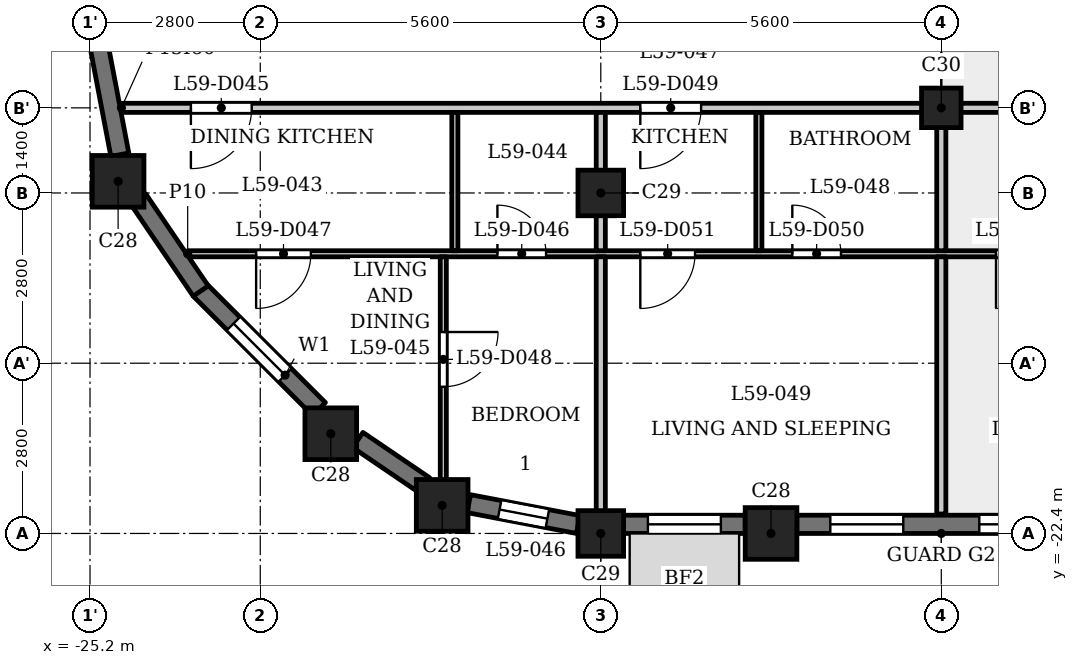
"""IFC4 building model, lengths in metres.
Left out: names, types, materials, properties, quantities, classifications, styles, units other than length and angle.
Written with IfcOpenShell. Run it as: python <this file> out.ifc"""

import sys

from ifc_helpers import new_model, si_unit, direction, frame, frame_2d, origin, origin_2d, place, context, subcontext, project, spatial, rectangle, extrude, element, fill, save


model = new_model("IFC4")
c1 = context("Model", 3, precision=1e-05, world=origin(), true_north=direction((0.0, 1.0)))
c2 = subcontext(c1, "Body", "Model", "MODEL_VIEW")
j1 = project(units=[si_unit("LENGTHUNIT", "METRE"), si_unit("PLANEANGLEUNIT", "RADIAN")], contexts=[c1])
p1 = place(None, origin())
s1 = spatial("IfcSite", under=j1, at=p1, CompositionType="ELEMENT")
p2 = place(p1, origin())
s2 = spatial("IfcBuilding", under=s1, at=p2, CompositionType="ELEMENT")
p3 = place(p2, frame((0.0, 0.0, 227.4)))
s3 = spatial("IfcBuildingStorey", under=s2, at=p3, CompositionType="ELEMENT", Elevation=227.4)
for number, where, z_axis, x_axis in (
    (1, (-19.409, -21.938, 0.0), (0.0, 0.0, 1.0), (1.0, 0.0, 0.0)),
    (2, (-14.0, -22.4, 0.0), (0.0, 0.0, 1.0), (1.0, 0.0, 0.0)),
    (3, (-24.738, -16.609, 0.0), (0.0, 0.0, 1.0), (1.0, 0.0, 0.0)),
    (4, (-21.24, -20.76, 0.0), (0.0, 0.0, 1.0), (1.0, 0.0, 0.0)),
):
    element("IfcColumn", number, at=place(p3, frame(where, z_axis=z_axis, x_axis=x_axis)), inside=s3, PredefinedType="COLUMN", context=c2, shape_type="SweptSolid", body=[
        extrude(rectangle(XDim=0.85, YDim=0.85, at=origin_2d()), origin(), (0.0, 0.0, 1.0), 3.5),
    ])
for number, where, z_axis, x_axis in (
    (5, (-16.8, -22.4, 0.0), (0.0, 0.0, 1.0), (1.0, 0.0, 0.0)),
    (6, (-16.8, -16.8, 0.0), (0.0, 0.0, 1.0), (1.0, 0.0, 0.0)),
):
    element("IfcColumn", number, at=place(p3, frame(where, z_axis=z_axis, x_axis=x_axis)), inside=s3, PredefinedType="COLUMN", context=c2, shape_type="SweptSolid", body=[
        extrude(rectangle(XDim=0.75, YDim=0.75, at=origin_2d()), origin(), (0.0, 0.0, 1.0), 3.5),
    ])
p4 = place(p3, frame((-11.2, -15.4, 0.0), z_axis=(0.0, 0.0, 1.0), x_axis=(1.0, 0.0, 0.0)))
e7 = element("IfcColumn", 7, at=p4, inside=s3, PredefinedType="COLUMN", context=c2, shape_type="SweptSolid", body=[
    extrude(rectangle(XDim=0.65, YDim=0.65, at=origin_2d()), origin(), (0.0, 0.0, 1.0), 3.5),
])
p5 = place(p3, frame((-23.397, -18.391, 0.0), z_axis=(0.0, 0.0, 1.0), x_axis=(0.707106781187, -0.707106781187, 0.0)))
e8 = element("IfcWall", 8, at=p5, inside=s3, PredefinedType="SOLIDWALL", context=c2, shape_type="SweptSolid", body=[
    extrude(rectangle(XDim=2.775, YDim=0.3, at=frame_2d((1.388, 0.0))), origin(), (0.0, 0.0, 1.0), 2.45),
])
p6 = place(p5, frame((0.788, 0.0, 0.6)))
e9 = element("IfcOpeningElement", 9, at=p6, cuts=e8, PredefinedType="OPENING", context=c2, shape_type="SweptSolid", body=[
    extrude(rectangle(XDim=1.2, YDim=1.55, at=frame_2d((0.6, 0.775))), frame((0.0, 0.16, 0.0), z_axis=(0.0, -1.0, 0.0), x_axis=(1.0, 0.0, 0.0)), (0.0, 0.0, 1.0), 0.32),
])
p7 = place(p3, frame((-20.796, -20.862, 0.0), z_axis=(0.0, 0.0, 1.0), x_axis=(0.827035970432, -0.562149004813, 0.0)))
e10 = element("IfcWall", 10, at=p7, inside=s3, PredefinedType="SOLIDWALL", context=c2, shape_type="SweptSolid", body=[
    extrude(rectangle(XDim=1.327, YDim=0.3, at=frame_2d((0.664, 0.0))), origin(), (0.0, 0.0, 1.0), 2.45),
])
p8 = place(p3, frame((-18.971, -21.91, 0.0), z_axis=(0.0, 0.0, 1.0), x_axis=(0.982300037503, -0.187314271538, 0.0)))
e11 = element("IfcWall", 11, at=p8, inside=s3, PredefinedType="SOLIDWALL", context=c2, shape_type="SweptSolid", body=[
    extrude(rectangle(XDim=1.831, YDim=0.3, at=frame_2d((0.916, 0.0))), origin(), (0.0, 0.0, 1.0), 2.45),
])
p9 = place(p8, frame((0.516, 0.0, 0.6)))
e12 = element("IfcOpeningElement", 12, at=p9, cuts=e11, PredefinedType="OPENING", context=c2, shape_type="SweptSolid", body=[
    extrude(rectangle(XDim=0.8, YDim=1.55, at=frame_2d((0.4, 0.775))), frame((0.0, 0.16, 0.0), z_axis=(0.0, -1.0, 0.0), x_axis=(1.0, 0.0, 0.0)), (0.0, 0.0, 1.0), 0.32),
])
p10 = place(p3, frame((-16.425, -22.25, 0.0), z_axis=(0.0, 0.0, 1.0), x_axis=(1.0, 0.0, 0.0)))
e13 = element("IfcWall", 13, at=p10, inside=s3, PredefinedType="SOLIDWALL", context=c2, shape_type="SweptSolid", body=[
    extrude(rectangle(XDim=2.0, YDim=0.3, at=frame_2d((1.0, 0.0))), origin(), (0.0, 0.0, 1.0), 2.45),
])
p11 = place(p10, frame((0.4, 0.0, 0.6)))
e14 = element("IfcOpeningElement", 14, at=p11, cuts=e13, PredefinedType="OPENING", context=c2, shape_type="SweptSolid", body=[
    extrude(rectangle(XDim=1.2, YDim=1.55, at=frame_2d((0.6, 0.775))), frame((0.0, 0.16, 0.0), z_axis=(0.0, -1.0, 0.0), x_axis=(1.0, 0.0, 0.0)), (0.0, 0.0, 1.0), 0.32),
])
p12 = place(p3, frame((-13.575, -22.25, 0.0), z_axis=(0.0, 0.0, 1.0), x_axis=(1.0, 0.0, 0.0)))
e15 = element("IfcWall", 15, at=p12, inside=s3, PredefinedType="SOLIDWALL", context=c2, shape_type="SweptSolid", body=[
    extrude(rectangle(XDim=4.75, YDim=0.3, at=frame_2d((2.375, 0.0))), origin(), (0.0, 0.0, 1.0), 2.45),
])
p13 = place(p12, frame((0.55, 0.0, 0.6)))
e16 = element("IfcOpeningElement", 16, at=p13, cuts=e15, PredefinedType="OPENING", context=c2, shape_type="SweptSolid", body=[
    extrude(rectangle(XDim=1.2, YDim=1.55, at=frame_2d((0.6, 0.775))), frame((0.0, 0.16, 0.0), z_axis=(0.0, -1.0, 0.0), x_axis=(1.0, 0.0, 0.0)), (0.0, 0.0, 1.0), 0.32),
])
p14 = place(p12, frame((3.0, 0.0, 0.6)))
e17 = element("IfcOpeningElement", 17, at=p14, cuts=e15, PredefinedType="OPENING", context=c2, shape_type="SweptSolid", body=[
    extrude(rectangle(XDim=1.2, YDim=1.55, at=frame_2d((0.6, 0.775))), frame((0.0, 0.16, 0.0), z_axis=(0.0, -1.0, 0.0), x_axis=(1.0, 0.0, 0.0)), (0.0, 0.0, 1.0), 0.32),
])
for number, where, z_axis, x_axis in (
    (18, (-25.053, -14.372, 0.0), (0.0, 0.0, 1.0), (0.187, -0.982, 0.0)),
    (19, (-24.408, -16.898, 0.0), (0.0, 0.0, 1.0), (0.562, -0.827, 0.0)),
):
    element("IfcWall", number, at=place(p3, frame(where, z_axis=z_axis, x_axis=x_axis)), inside=s3, PredefinedType="SOLIDWALL", context=c2, shape_type="SweptSolid", body=[
        extrude(rectangle(XDim=1.831, YDim=0.3, at=frame_2d((0.916, 0.0))), origin(), (0.0, 0.0, 1.0), 2.45),
    ])
p15 = place(p3, frame((-23.594, -17.8, 0.0), z_axis=(0.0, 0.0, 1.0), x_axis=(1.0, 0.0, 0.0)))
e20 = element("IfcWall", 20, at=p15, inside=s3, PredefinedType="PARTITIONING", context=c2, shape_type="SweptSolid", body=[
    extrude(rectangle(XDim=47.188, YDim=0.1, at=frame_2d((23.594, 0.0))), origin(), (0.0, 0.0, 1.0), 3.15),
])
p16 = place(p15, frame((5.094, 0.0, 0.0)))
e21 = element("IfcOpeningElement", 21, at=p16, cuts=e20, PredefinedType="OPENING", context=c2, shape_type="SweptSolid", body=[
    extrude(rectangle(XDim=0.8, YDim=2.1, at=frame_2d((0.4, 1.05))), frame((0.0, 0.06, 0.0), z_axis=(0.0, -1.0, 0.0), x_axis=(1.0, 0.0, 0.0)), (0.0, 0.0, 1.0), 0.12),
])
p17 = place(p15, frame((1.126, 0.0, 0.0)))
e22 = element("IfcOpeningElement", 22, at=p17, cuts=e20, PredefinedType="OPENING", context=c2, shape_type="SweptSolid", body=[
    extrude(rectangle(XDim=0.9, YDim=2.1, at=frame_2d((0.45, 1.05))), frame((0.0, 0.06, 0.0), z_axis=(0.0, -1.0, 0.0), x_axis=(1.0, 0.0, 0.0)), (0.0, 0.0, 1.0), 0.12),
])
p18 = place(p15, frame((9.944, 0.0, 0.0)))
e23 = element("IfcOpeningElement", 23, at=p18, cuts=e20, PredefinedType="OPENING", context=c2, shape_type="SweptSolid", body=[
    extrude(rectangle(XDim=0.8, YDim=2.1, at=frame_2d((0.4, 1.05))), frame((0.0, 0.06, 0.0), z_axis=(0.0, -1.0, 0.0), x_axis=(1.0, 0.0, 0.0)), (0.0, 0.0, 1.0), 0.12),
])
p19 = place(p15, frame((7.444, 0.0, 0.0)))
e24 = element("IfcOpeningElement", 24, at=p19, cuts=e20, PredefinedType="OPENING", context=c2, shape_type="SweptSolid", body=[
    extrude(rectangle(XDim=0.9, YDim=2.1, at=frame_2d((0.45, 1.05))), frame((0.0, 0.06, 0.0), z_axis=(0.0, -1.0, 0.0), x_axis=(1.0, 0.0, 0.0)), (0.0, 0.0, 1.0), 0.12),
])
p20 = place(p15, frame((16.544, 0.0, 0.0)))
e25 = element("IfcOpeningElement", 25, at=p20, cuts=e20, PredefinedType="OPENING", context=c2, shape_type="SweptSolid", body=[
    extrude(rectangle(XDim=0.8, YDim=2.1, at=frame_2d((0.4, 1.05))), frame((0.0, 0.06, 0.0), z_axis=(0.0, -1.0, 0.0), x_axis=(1.0, 0.0, 0.0)), (0.0, 0.0, 1.0), 0.12),
])
p21 = place(p15, frame((13.294, 0.0, 0.0)))
e26 = element("IfcOpeningElement", 26, at=p21, cuts=e20, PredefinedType="OPENING", context=c2, shape_type="SweptSolid", body=[
    extrude(rectangle(XDim=0.9, YDim=2.1, at=frame_2d((0.45, 1.05))), frame((0.0, 0.06, 0.0), z_axis=(0.0, -1.0, 0.0), x_axis=(1.0, 0.0, 0.0)), (0.0, 0.0, 1.0), 0.12),
])
p22 = place(p15, frame((21.144, 0.0, 0.0)))
e27 = element("IfcOpeningElement", 27, at=p22, cuts=e20, PredefinedType="OPENING", context=c2, shape_type="SweptSolid", body=[
    extrude(rectangle(XDim=0.8, YDim=2.1, at=frame_2d((0.4, 1.05))), frame((0.0, 0.06, 0.0), z_axis=(0.0, -1.0, 0.0), x_axis=(1.0, 0.0, 0.0)), (0.0, 0.0, 1.0), 0.12),
])
p23 = place(p15, frame((18.894, 0.0, 0.0)))
e28 = element("IfcOpeningElement", 28, at=p23, cuts=e20, PredefinedType="OPENING", context=c2, shape_type="SweptSolid", body=[
    extrude(rectangle(XDim=0.9, YDim=2.1, at=frame_2d((0.45, 1.05))), frame((0.0, 0.06, 0.0), z_axis=(0.0, -1.0, 0.0), x_axis=(1.0, 0.0, 0.0)), (0.0, 0.0, 1.0), 0.12),
])
p24 = place(p15, frame((35.944, 0.0, 0.0)))
e29 = element("IfcOpeningElement", 29, at=p24, cuts=e20, PredefinedType="OPENING", context=c2, shape_type="SweptSolid", body=[
    extrude(rectangle(XDim=0.9, YDim=2.1, at=frame_2d((0.45, 1.05))), frame((0.0, 0.06, 0.0), z_axis=(0.0, -1.0, 0.0), x_axis=(1.0, 0.0, 0.0)), (0.0, 0.0, 1.0), 0.12),
])
p25 = place(p15, frame((32.594, 0.0, 0.0)))
e30 = element("IfcOpeningElement", 30, at=p25, cuts=e20, PredefinedType="OPENING", context=c2, shape_type="SweptSolid", body=[
    extrude(rectangle(XDim=0.9, YDim=2.1, at=frame_2d((0.45, 1.05))), frame((0.0, 0.06, 0.0), z_axis=(0.0, -1.0, 0.0), x_axis=(1.0, 0.0, 0.0)), (0.0, 0.0, 1.0), 0.12),
])
p26 = place(p15, frame((40.944, 0.0, 0.0)))
e31 = element("IfcOpeningElement", 31, at=p26, cuts=e20, PredefinedType="OPENING", context=c2, shape_type="SweptSolid", body=[
    extrude(rectangle(XDim=0.8, YDim=2.1, at=frame_2d((0.4, 1.05))), frame((0.0, 0.06, 0.0), z_axis=(0.0, -1.0, 0.0), x_axis=(1.0, 0.0, 0.0)), (0.0, 0.0, 1.0), 0.12),
])
p27 = place(p15, frame((45.444, 0.0, 0.0)))
e32 = element("IfcOpeningElement", 32, at=p27, cuts=e20, PredefinedType="OPENING", context=c2, shape_type="SweptSolid", body=[
    extrude(rectangle(XDim=0.9, YDim=2.1, at=frame_2d((0.45, 1.05))), frame((0.0, 0.06, 0.0), z_axis=(0.0, -1.0, 0.0), x_axis=(1.0, 0.0, 0.0)), (0.0, 0.0, 1.0), 0.12),
])
p28 = place(p3, frame((-24.684, -15.4, 0.0), z_axis=(0.0, 0.0, 1.0), x_axis=(1.0, 0.0, 0.0)))
e33 = element("IfcWall", 33, at=p28, inside=s3, PredefinedType="PARTITIONING", context=c2, shape_type="SweptSolid", body=[
    extrude(rectangle(XDim=49.368, YDim=0.15, at=frame_2d((24.684, 0.0))), origin(), (0.0, 0.0, 1.0), 3.15),
])
p29 = place(p28, frame((1.143, 0.0, 0.0)))
e34 = element("IfcOpeningElement", 34, at=p29, cuts=e33, PredefinedType="OPENING", context=c2, shape_type="SweptSolid", body=[
    extrude(rectangle(XDim=1.0, YDim=2.1, at=frame_2d((0.5, 1.05))), frame((0.0, 0.085, 0.0), z_axis=(0.0, -1.0, 0.0), x_axis=(1.0, 0.0, 0.0)), (0.0, 0.0, 1.0), 0.17),
])
p30 = place(p28, frame((8.534, 0.0, 0.0)))
e35 = element("IfcOpeningElement", 35, at=p30, cuts=e33, PredefinedType="OPENING", context=c2, shape_type="SweptSolid", body=[
    extrude(rectangle(XDim=1.0, YDim=2.1, at=frame_2d((0.5, 1.05))), frame((0.0, 0.085, 0.0), z_axis=(0.0, -1.0, 0.0), x_axis=(1.0, 0.0, 0.0)), (0.0, 0.0, 1.0), 0.17),
])
p31 = place(p28, frame((15.384, 0.0, 0.0)))
e36 = element("IfcOpeningElement", 36, at=p31, cuts=e33, PredefinedType="OPENING", context=c2, shape_type="SweptSolid", body=[
    extrude(rectangle(XDim=1.0, YDim=2.1, at=frame_2d((0.5, 1.05))), frame((0.0, 0.085, 0.0), z_axis=(0.0, -1.0, 0.0), x_axis=(1.0, 0.0, 0.0)), (0.0, 0.0, 1.0), 0.17),
])
p32 = place(p28, frame((19.984, 0.0, 0.0)))
e37 = element("IfcOpeningElement", 37, at=p32, cuts=e33, PredefinedType="OPENING", context=c2, shape_type="SweptSolid", body=[
    extrude(rectangle(XDim=1.0, YDim=2.1, at=frame_2d((0.5, 1.05))), frame((0.0, 0.085, 0.0), z_axis=(0.0, -1.0, 0.0), x_axis=(1.0, 0.0, 0.0)), (0.0, 0.0, 1.0), 0.17),
])
p33 = place(p28, frame((39.784, 0.0, 0.0)))
e38 = element("IfcOpeningElement", 38, at=p33, cuts=e33, PredefinedType="OPENING", context=c2, shape_type="SweptSolid", body=[
    extrude(rectangle(XDim=1.0, YDim=2.1, at=frame_2d((0.5, 1.05))), frame((0.0, 0.085, 0.0), z_axis=(0.0, -1.0, 0.0), x_axis=(1.0, 0.0, 0.0)), (0.0, 0.0, 1.0), 0.17),
])
p34 = place(p28, frame((47.384, 0.0, 0.0)))
e39 = element("IfcOpeningElement", 39, at=p34, cuts=e33, PredefinedType="OPENING", context=c2, shape_type="SweptSolid", body=[
    extrude(rectangle(XDim=1.0, YDim=2.1, at=frame_2d((0.5, 1.05))), frame((0.0, 0.085, 0.0), z_axis=(0.0, -1.0, 0.0), x_axis=(1.0, 0.0, 0.0)), (0.0, 0.0, 1.0), 0.17),
])
p35 = place(p3, frame((-19.39, -21.86, 0.0), z_axis=(0.0, 0.0, 1.0), x_axis=(0.0, 1.0, 0.0)))
e40 = element("IfcWall", 40, at=p35, inside=s3, PredefinedType="PARTITIONING", context=c2, shape_type="SweptSolid", body=[
    extrude(rectangle(XDim=4.01, YDim=0.1, at=frame_2d((2.005, 0.0))), origin(), (0.0, 0.0, 1.0), 3.15),
])
p36 = place(p35, frame((1.873, 0.0, 0.0)))
e41 = element("IfcOpeningElement", 41, at=p36, cuts=e40, PredefinedType="OPENING", context=c2, shape_type="SweptSolid", body=[
    extrude(rectangle(XDim=0.9, YDim=2.1, at=frame_2d((0.45, 1.05))), frame((0.0, 0.06, 0.0), z_axis=(0.0, -1.0, 0.0), x_axis=(1.0, 0.0, 0.0)), (0.0, 0.0, 1.0), 0.12),
])
p37 = place(p3, frame((-19.2, -17.75, 0.0), z_axis=(0.0, 0.0, 1.0), x_axis=(0.0, 1.0, 0.0)))
e42 = element("IfcWall", 42, at=p37, inside=s3, PredefinedType="PARTITIONING", context=c2, shape_type="SweptSolid", body=[
    extrude(rectangle(XDim=2.275, YDim=0.1, at=frame_2d((1.137, 0.0))), origin(), (0.0, 0.0, 1.0), 3.15),
])
p38 = place(p3, frame((-16.8, -22.31, 0.0), z_axis=(0.0, 0.0, 1.0), x_axis=(0.0, 1.0, 0.0)))
e43 = element("IfcWall", 43, at=p38, inside=s3, PredefinedType="PARTITIONING", context=c2, shape_type="SweptSolid", body=[
    extrude(rectangle(XDim=4.46, YDim=0.15, at=frame_2d((2.23, 0.0))), origin(), (0.0, 0.0, 1.0), 2.5),
])
p39 = place(p3, frame((-16.8, -17.75, 0.0), z_axis=(0.0, 0.0, 1.0), x_axis=(0.0, 1.0, 0.0)))
e44 = element("IfcWall", 44, at=p39, inside=s3, PredefinedType="PARTITIONING", context=c2, shape_type="SweptSolid", body=[
    extrude(rectangle(XDim=2.275, YDim=0.15, at=frame_2d((1.137, 0.0))), origin(), (0.0, 0.0, 1.0), 2.5),
])
p40 = place(p3, frame((-14.2, -17.75, 0.0), z_axis=(0.0, 0.0, 1.0), x_axis=(0.0, 1.0, 0.0)))
e45 = element("IfcWall", 45, at=p40, inside=s3, PredefinedType="PARTITIONING", context=c2, shape_type="SweptSolid", body=[
    extrude(rectangle(XDim=2.275, YDim=0.1, at=frame_2d((1.137, 0.0))), origin(), (0.0, 0.0, 1.0), 3.15),
])
p41 = place(p3, frame((-11.2, -22.08, 0.0), z_axis=(0.0, 0.0, 1.0), x_axis=(0.0, 1.0, 0.0)))
e46 = element("IfcWall", 46, at=p41, inside=s3, PredefinedType="PARTITIONING", context=c2, shape_type="SweptSolid", body=[
    extrude(rectangle(XDim=4.23, YDim=0.15, at=frame_2d((2.115, 0.0))), origin(), (0.0, 0.0, 1.0), 3.15),
])
p42 = place(p3, frame((-11.2, -17.75, 0.0), z_axis=(0.0, 0.0, 1.0), x_axis=(0.0, 1.0, 0.0)))
e47 = element("IfcWall", 47, at=p42, inside=s3, PredefinedType="PARTITIONING", context=c2, shape_type="SweptSolid", body=[
    extrude(rectangle(XDim=2.275, YDim=0.15, at=frame_2d((1.137, 0.0))), origin(), (0.0, 0.0, 1.0), 3.15),
])
p43 = place(p29, origin())
e48 = element("IfcDoor", 48, at=p43, inside=s3, OperationType="SINGLE_SWING_LEFT", PredefinedType="DOOR", context=c2, shape_type="SweptSolid", body=[
    extrude(rectangle(XDim=1.0, YDim=2.1, at=frame_2d((0.5, 1.05))), frame((0.0, 0.025, 0.0), z_axis=(0.0, -1.0, 0.0), x_axis=(1.0, 0.0, 0.0)), (0.0, 0.0, 1.0), 0.05),
])
fill(e34, e48)
p44 = place(p16, origin())
e49 = element("IfcDoor", 49, at=p44, inside=s3, OperationType="SINGLE_SWING_RIGHT", PredefinedType="DOOR", context=c2, shape_type="SweptSolid", body=[
    extrude(rectangle(XDim=0.8, YDim=2.1, at=frame_2d((0.4, 1.05))), frame((0.0, 0.025, 0.0), z_axis=(0.0, -1.0, 0.0), x_axis=(1.0, 0.0, 0.0)), (0.0, 0.0, 1.0), 0.05),
])
fill(e21, e49)
p45 = place(p17, origin())
e50 = element("IfcDoor", 50, at=p45, inside=s3, OperationType="SINGLE_SWING_LEFT", PredefinedType="DOOR", context=c2, shape_type="SweptSolid", body=[
    extrude(rectangle(XDim=0.9, YDim=2.1, at=frame_2d((0.45, 1.05))), frame((0.0, 0.025, 0.0), z_axis=(0.0, -1.0, 0.0), x_axis=(1.0, 0.0, 0.0)), (0.0, 0.0, 1.0), 0.05),
])
fill(e22, e50)
p46 = place(p36, origin())
e51 = element("IfcDoor", 51, at=p46, inside=s3, OperationType="SINGLE_SWING_RIGHT", PredefinedType="DOOR", context=c2, shape_type="SweptSolid", body=[
    extrude(rectangle(XDim=0.9, YDim=2.1, at=frame_2d((0.45, 1.05))), frame((0.0, 0.025, 0.0), z_axis=(0.0, -1.0, 0.0), x_axis=(1.0, 0.0, 0.0)), (0.0, 0.0, 1.0), 0.05),
])
fill(e41, e51)
p47 = place(p30, origin())
e52 = element("IfcDoor", 52, at=p47, inside=s3, OperationType="SINGLE_SWING_LEFT", PredefinedType="DOOR", context=c2, shape_type="SweptSolid", body=[
    extrude(rectangle(XDim=1.0, YDim=2.1, at=frame_2d((0.5, 1.05))), frame((0.0, 0.025, 0.0), z_axis=(0.0, -1.0, 0.0), x_axis=(1.0, 0.0, 0.0)), (0.0, 0.0, 1.0), 0.05),
])
fill(e35, e52)
p48 = place(p18, origin())
e53 = element("IfcDoor", 53, at=p48, inside=s3, OperationType="SINGLE_SWING_RIGHT", PredefinedType="DOOR", context=c2, shape_type="SweptSolid", body=[
    extrude(rectangle(XDim=0.8, YDim=2.1, at=frame_2d((0.4, 1.05))), frame((0.0, 0.025, 0.0), z_axis=(0.0, -1.0, 0.0), x_axis=(1.0, 0.0, 0.0)), (0.0, 0.0, 1.0), 0.05),
])
fill(e23, e53)
p49 = place(p19, origin())
e54 = element("IfcDoor", 54, at=p49, inside=s3, OperationType="SINGLE_SWING_LEFT", PredefinedType="DOOR", context=c2, shape_type="SweptSolid", body=[
    extrude(rectangle(XDim=0.9, YDim=2.1, at=frame_2d((0.45, 1.05))), frame((0.0, 0.025, 0.0), z_axis=(0.0, -1.0, 0.0), x_axis=(1.0, 0.0, 0.0)), (0.0, 0.0, 1.0), 0.05),
])
fill(e24, e54)
p50 = place(p21, origin())
e55 = element("IfcDoor", 55, at=p50, inside=s3, OperationType="SINGLE_SWING_LEFT", PredefinedType="DOOR", context=c2, shape_type="SweptSolid", body=[
    extrude(rectangle(XDim=0.9, YDim=2.1, at=frame_2d((0.45, 1.05))), frame((0.0, 0.025, 0.0), z_axis=(0.0, -1.0, 0.0), x_axis=(1.0, 0.0, 0.0)), (0.0, 0.0, 1.0), 0.05),
])
fill(e26, e55)
p51 = place(p6, origin())
e56 = element("IfcWindow", 56, at=p51, inside=s3, PartitioningType="SINGLE_PANEL", PredefinedType="WINDOW", context=c2, shape_type="SweptSolid", body=[
    extrude(rectangle(XDim=1.2, YDim=1.55, at=frame_2d((0.6, 0.775))), frame((0.0, 0.03, 0.0), z_axis=(0.0, -1.0, 0.0), x_axis=(1.0, 0.0, 0.0)), (0.0, 0.0, 1.0), 0.06),
])
fill(e9, e56)
p52 = place(p9, origin())
e57 = element("IfcWindow", 57, at=p52, inside=s3, PartitioningType="SINGLE_PANEL", PredefinedType="WINDOW", context=c2, shape_type="SweptSolid", body=[
    extrude(rectangle(XDim=0.8, YDim=1.55, at=frame_2d((0.4, 0.775))), frame((0.0, 0.03, 0.0), z_axis=(0.0, -1.0, 0.0), x_axis=(1.0, 0.0, 0.0)), (0.0, 0.0, 1.0), 0.06),
])
fill(e12, e57)
p53 = place(p11, origin())
e58 = element("IfcWindow", 58, at=p53, inside=s3, PartitioningType="SINGLE_PANEL", PredefinedType="WINDOW", context=c2, shape_type="SweptSolid", body=[
    extrude(rectangle(XDim=1.2, YDim=1.55, at=frame_2d((0.6, 0.775))), frame((0.0, 0.03, 0.0), z_axis=(0.0, -1.0, 0.0), x_axis=(1.0, 0.0, 0.0)), (0.0, 0.0, 1.0), 0.06),
])
fill(e14, e58)
p54 = place(p13, origin())
e59 = element("IfcWindow", 59, at=p54, inside=s3, PartitioningType="SINGLE_PANEL", PredefinedType="WINDOW", context=c2, shape_type="SweptSolid", body=[
    extrude(rectangle(XDim=1.2, YDim=1.55, at=frame_2d((0.6, 0.775))), frame((0.0, 0.03, 0.0), z_axis=(0.0, -1.0, 0.0), x_axis=(1.0, 0.0, 0.0)), (0.0, 0.0, 1.0), 0.06),
])
fill(e16, e59)
p55 = place(p14, origin())
e60 = element("IfcWindow", 60, at=p55, inside=s3, PartitioningType="SINGLE_PANEL", PredefinedType="WINDOW", context=c2, shape_type="SweptSolid", body=[
    extrude(rectangle(XDim=1.2, YDim=1.55, at=frame_2d((0.6, 0.775))), frame((0.0, 0.03, 0.0), z_axis=(0.0, -1.0, 0.0), x_axis=(1.0, 0.0, 0.0)), (0.0, 0.0, 1.0), 0.06),
])
fill(e17, e60)
save(model, sys.argv[1])
